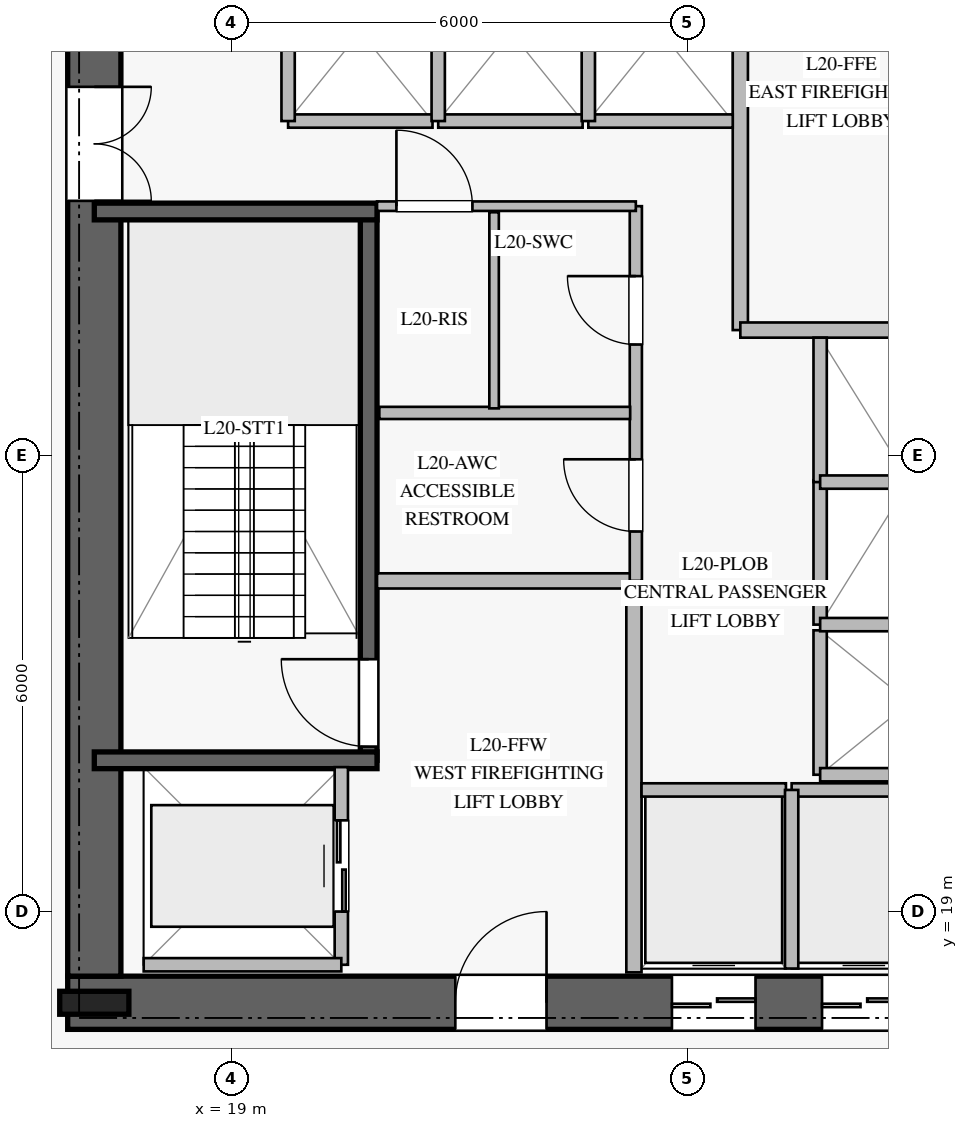
"""IFC4 building model, lengths in metres.
Left out: names, types, materials, properties, quantities, classifications, styles, units other than length and angle.
Written with IfcOpenShell. Run it as: python <this file> out.ifc"""

import sys

from ifc_helpers import new_model, si_unit, direction, frame, frame_2d, origin, origin_2d, place, context, subcontext, project, spatial, rectangle, i_section, extrude, element, fill, save


model = new_model("IFC4")
c1 = context("Model", 3, precision=1e-05, world=origin(), true_north=direction((0.0, 1.0)))
c2 = subcontext(c1, "Body", "Model", "MODEL_VIEW")
j1 = project(units=[si_unit("LENGTHUNIT", "METRE"), si_unit("PLANEANGLEUNIT", "RADIAN")], contexts=[c1])
p1 = place(None, origin())
s1 = spatial("IfcSite", under=j1, at=p1, CompositionType="ELEMENT")
p2 = place(p1, origin())
s2 = spatial("IfcBuilding", under=s1, at=p2, CompositionType="ELEMENT")
p3 = place(p2, frame((0.0, 0.0, 84.0)))
s3 = spatial("IfcBuildingStorey", under=s2, at=p3, CompositionType="ELEMENT", Elevation=84.0)
p4 = place(p3, frame((16.85, 17.8, 0.0), z_axis=(0.0, 0.0, 1.0), x_axis=(1.0, 0.0, 0.0)))
e1 = element("IfcWall", 1, at=p4, inside=s3, PredefinedType="SHEAR", context=c2, shape_type="SweptSolid", body=[
    extrude(rectangle(XDim=16.3, YDim=0.7, at=frame_2d((8.15, 0.0))), origin(), (0.0, 0.0, 1.0), 3.76),
])
p5 = place(p4, frame((5.1, 0.0, 0.0)))
e2 = element("IfcOpeningElement", 2, at=p5, cuts=e1, PredefinedType="OPENING", context=c2, shape_type="SweptSolid", body=[
    extrude(rectangle(XDim=1.2, YDim=2.25, at=frame_2d((0.6, 1.125))), frame((0.0, 0.36, 0.0), z_axis=(0.0, -1.0, 0.0), x_axis=(1.0, 0.0, 0.0)), (0.0, 0.0, 1.0), 0.72),
])
p6 = place(p4, frame((14.05, 0.0, 0.0)))
e3 = element("IfcOpeningElement", 3, at=p6, cuts=e1, PredefinedType="OPENING", context=c2, shape_type="SweptSolid", body=[
    extrude(rectangle(XDim=0.9, YDim=2.1, at=frame_2d((0.45, 1.05))), frame((0.0, 0.36, 0.0), z_axis=(0.0, -1.0, 0.0), x_axis=(1.0, 0.0, 0.0)), (0.0, 0.0, 1.0), 0.72),
])
p7 = place(p4, frame((7.95, 0.0, 0.0)))
e4 = element("IfcOpeningElement", 4, at=p7, cuts=e1, PredefinedType="OPENING", context=c2, shape_type="SweptSolid", body=[
    extrude(rectangle(XDim=1.1, YDim=2.2, at=frame_2d((0.55, 1.1))), frame((0.0, 0.36, 0.0), z_axis=(0.0, -1.0, 0.0), x_axis=(1.0, 0.0, 0.0)), (0.0, 0.0, 1.0), 0.72),
])
p8 = place(p4, frame((9.925, 0.0, 0.0)))
e5 = element("IfcOpeningElement", 5, at=p8, cuts=e1, PredefinedType="OPENING", context=c2, shape_type="SweptSolid", body=[
    extrude(rectangle(XDim=1.1, YDim=2.2, at=frame_2d((0.55, 1.1))), frame((0.0, 0.36, 0.0), z_axis=(0.0, -1.0, 0.0), x_axis=(1.0, 0.0, 0.0)), (0.0, 0.0, 1.0), 0.72),
])
p9 = place(p4, frame((11.9, 0.0, 0.0)))
e6 = element("IfcOpeningElement", 6, at=p9, cuts=e1, PredefinedType="OPENING", context=c2, shape_type="SweptSolid", body=[
    extrude(rectangle(XDim=1.1, YDim=2.2, at=frame_2d((0.55, 1.1))), frame((0.0, 0.36, 0.0), z_axis=(0.0, -1.0, 0.0), x_axis=(1.0, 0.0, 0.0)), (0.0, 0.0, 1.0), 0.72),
])
p10 = place(p3, frame((17.2, 31.85, 0.0), z_axis=(0.0, 0.0, 1.0), x_axis=(0.0, -1.0, 0.0)))
e7 = element("IfcWall", 7, at=p10, inside=s3, PredefinedType="SHEAR", context=c2, shape_type="SweptSolid", body=[
    extrude(rectangle(XDim=13.7, YDim=0.7, at=frame_2d((6.85, 0.0))), origin(), (0.0, 0.0, 1.0), 3.76),
])
p11 = place(p10, frame((2.0, 0.0, 0.0)))
e8 = element("IfcOpeningElement", 8, at=p11, cuts=e7, PredefinedType="OPENING", context=c2, shape_type="SweptSolid", body=[
    extrude(rectangle(XDim=1.5, YDim=2.2, at=frame_2d((0.75, 1.1))), frame((0.0, 0.36, 0.0), z_axis=(0.0, -1.0, 0.0), x_axis=(1.0, 0.0, 0.0)), (0.0, 0.0, 1.0), 0.72),
])
p12 = place(p3, frame((17.2, 17.8, 0.0), z_axis=(0.0, 0.0, 1.0), x_axis=(1.0, 0.0, 0.0)))
e9 = element("IfcColumn", 9, at=p12, inside=s3, PredefinedType="COLUMN", context=c2, shape_type="SweptSolid", body=[
    extrude(i_section(OverallWidth=0.302, OverallDepth=0.91, WebThickness=0.021, FlangeThickness=0.04, at=origin_2d()), origin(), (0.0, 0.0, 1.0), 4.0),
])
p13 = place(p3, frame((20.81, 20.99, 0.0), z_axis=(0.0, 0.0, 1.0), x_axis=(0.0, 1.0, 0.0)))
e10 = element("IfcWall", 10, at=p13, inside=s3, PredefinedType="SOLIDWALL", context=c2, shape_type="SweptSolid", body=[
    extrude(rectangle(XDim=7.22, YDim=0.22, at=frame_2d((3.61, 0.0))), origin(), (0.0, 0.0, 1.0), 3.76),
])
p14 = place(p13, frame((0.18, 0.0, 0.0)))
e11 = element("IfcOpeningElement", 11, at=p14, cuts=e10, PredefinedType="OPENING", context=c2, shape_type="SweptSolid", body=[
    extrude(rectangle(XDim=1.15, YDim=2.2, at=frame_2d((0.575, 1.1))), frame((0.0, 0.12, 0.0), z_axis=(0.0, -1.0, 0.0), x_axis=(1.0, 0.0, 0.0)), (0.0, 0.0, 1.0), 0.24),
])
for number, where, z_axis, x_axis in (
    (12, (17.2, 20.99, 0.0), (0.0, 0.0, 1.0), (1.0, 0.0, 0.0)),
    (13, (17.2, 28.21, 0.0), (0.0, 0.0, 1.0), (1.0, 0.0, 0.0)),
):
    element("IfcWall", number, at=place(p3, frame(where, z_axis=z_axis, x_axis=x_axis)), inside=s3, PredefinedType="SOLIDWALL", context=c2, shape_type="SweptSolid", body=[
        extrude(rectangle(XDim=3.72, YDim=0.22, at=frame_2d((1.86, 0.0))), origin(), (0.0, 0.0, 1.0), 3.76),
    ])
p15 = place(p3, frame((24.3, 18.2, 0.0), z_axis=(0.0, 0.0, 1.0), x_axis=(0.0, 1.0, 0.0)))
e14 = element("IfcWall", 14, at=p15, inside=s3, PredefinedType="PARTITIONING", context=c2, shape_type="SweptSolid", body=[
    extrude(rectangle(XDim=5.15, YDim=0.2, at=frame_2d((2.575, 0.0))), origin(), (0.0, 0.0, 1.0), 3.76),
])
p16 = place(p3, frame((20.92, 23.35, 0.0), z_axis=(0.0, 0.0, 1.0), x_axis=(1.0, 0.0, 0.0)))
e15 = element("IfcWall", 15, at=p16, inside=s3, PredefinedType="PARTITIONING", context=c2, shape_type="SweptSolid", body=[
    extrude(rectangle(XDim=3.38, YDim=0.2, at=frame_2d((1.69, 0.0))), origin(), (0.0, 0.0, 1.0), 3.76),
])
p17 = place(p3, frame((25.7, 26.65, 0.0), z_axis=(0.0, 0.0, 1.0), x_axis=(0.0, 1.0, 0.0)))
e16 = element("IfcWall", 16, at=p17, inside=s3, PredefinedType="PARTITIONING", context=c2, shape_type="SweptSolid", body=[
    extrude(rectangle(XDim=5.15, YDim=0.2, at=frame_2d((2.575, 0.0))), origin(), (0.0, 0.0, 1.0), 3.76),
])
p18 = place(p3, frame((25.7, 26.65, 0.0), z_axis=(0.0, 0.0, 1.0), x_axis=(1.0, 0.0, 0.0)))
e17 = element("IfcWall", 17, at=p18, inside=s3, PredefinedType="PARTITIONING", context=c2, shape_type="SweptSolid", body=[
    extrude(rectangle(XDim=3.38, YDim=0.2, at=frame_2d((1.69, 0.0))), origin(), (0.0, 0.0, 1.0), 3.76),
])
p19 = place(p3, frame((24.325, 23.35, 0.0), z_axis=(0.0, 0.0, 1.0), x_axis=(0.0, 1.0, 0.0)))
e18 = element("IfcWall", 18, at=p19, inside=s3, PredefinedType="PLUMBINGWALL", context=c2, shape_type="SweptSolid", body=[
    extrude(rectangle(XDim=4.93, YDim=0.16, at=frame_2d((2.465, 0.0))), origin(), (0.0, 0.0, 1.0), 3.76),
])
p20 = place(p19, frame((0.65, 0.0, 0.0)))
e19 = element("IfcOpeningElement", 19, at=p20, cuts=e18, PredefinedType="OPENING", context=c2, shape_type="SweptSolid", body=[
    extrude(rectangle(XDim=0.95, YDim=2.1, at=frame_2d((0.475, 1.05))), frame((0.0, 0.09, 0.0), z_axis=(0.0, -1.0, 0.0), x_axis=(1.0, 0.0, 0.0)), (0.0, 0.0, 1.0), 0.18),
])
p21 = place(p19, frame((3.11, 0.0, 0.0)))
e20 = element("IfcOpeningElement", 20, at=p21, cuts=e18, PredefinedType="OPENING", context=c2, shape_type="SweptSolid", body=[
    extrude(rectangle(XDim=0.9, YDim=2.1, at=frame_2d((0.45, 1.05))), frame((0.0, 0.09, 0.0), z_axis=(0.0, -1.0, 0.0), x_axis=(1.0, 0.0, 0.0)), (0.0, 0.0, 1.0), 0.18),
])
p22 = place(p3, frame((20.92, 28.28, 0.0), z_axis=(0.0, 0.0, 1.0), x_axis=(1.0, 0.0, 0.0)))
e21 = element("IfcWall", 21, at=p22, inside=s3, PredefinedType="PARTITIONING", context=c2, shape_type="SweptSolid", body=[
    extrude(rectangle(XDim=3.405, YDim=0.125, at=frame_2d((1.703, 0.0))), origin(), (0.0, 0.0, 1.0), 3.76),
])
p23 = place(p22, frame((0.255, 0.0, 0.0)))
e22 = element("IfcOpeningElement", 22, at=p23, cuts=e21, PredefinedType="OPENING", context=c2, shape_type="SweptSolid", body=[
    extrude(rectangle(XDim=1.0, YDim=2.15, at=frame_2d((0.5, 1.075))), frame((0.0, 0.073, 0.0), z_axis=(0.0, -1.0, 0.0), x_axis=(1.0, 0.0, 0.0)), (0.0, 0.0, 1.0), 0.145),
])
p24 = place(p3, frame((20.95, 25.56, 0.0), z_axis=(0.0, 0.0, 1.0), x_axis=(1.0, 0.0, 0.0)))
e23 = element("IfcWall", 23, at=p24, inside=s3, PredefinedType="PLUMBINGWALL", context=c2, shape_type="SweptSolid", body=[
    extrude(rectangle(XDim=3.3, YDim=0.16, at=frame_2d((1.65, 0.0))), origin(), (0.0, 0.0, 1.0), 3.76),
])
p25 = place(p3, frame((22.46, 25.62, 0.0), z_axis=(0.0, 0.0, 1.0), x_axis=(0.0, 1.0, 0.0)))
e24 = element("IfcWall", 24, at=p25, inside=s3, PredefinedType="PARTITIONING", context=c2, shape_type="SweptSolid", body=[
    extrude(rectangle(XDim=2.58, YDim=0.125, at=frame_2d((1.29, 0.0))), origin(), (0.0, 0.0, 1.0), 3.76),
])
p26 = place(p3, frame((24.4, 20.6, 0.0), z_axis=(0.0, 0.0, 1.0), x_axis=(1.0, 0.0, 0.0)))
e25 = element("IfcWall", 25, at=p26, inside=s3, PredefinedType="PARTITIONING", context=c2, shape_type="SweptSolid", body=[
    extrude(rectangle(XDim=1.9, YDim=0.175, at=frame_2d((0.95, 0.0))), origin(), (0.0, 0.0, 1.0), 3.76),
])
p27 = place(p3, frame((26.375, 20.6, 0.0), z_axis=(0.0, 0.0, 1.0), x_axis=(1.0, 0.0, 0.0)))
e26 = element("IfcWall", 26, at=p27, inside=s3, PredefinedType="PARTITIONING", context=c2, shape_type="SweptSolid", body=[
    extrude(rectangle(XDim=1.9, YDim=0.175, at=frame_2d((0.95, 0.0))), origin(), (0.0, 0.0, 1.0), 3.76),
])
p28 = place(p3, frame((26.375, 18.25, 0.0), z_axis=(0.0, 0.0, 1.0), x_axis=(0.0, 1.0, 0.0)))
e27 = element("IfcWall", 27, at=p28, inside=s3, PredefinedType="PARTITIONING", context=c2, shape_type="SweptSolid", body=[
    extrude(rectangle(XDim=2.35, YDim=0.175, at=frame_2d((1.175, 0.0))), origin(), (0.0, 0.0, 1.0), 3.76),
])
p29 = place(p3, frame((19.75, 29.4, 0.0), z_axis=(0.0, 0.0, 1.0), x_axis=(1.0, 0.0, 0.0)))
e28 = element("IfcWall", 28, at=p29, inside=s3, PredefinedType="PARTITIONING", context=c2, shape_type="SweptSolid", body=[
    extrude(rectangle(XDim=1.9, YDim=0.175, at=frame_2d((0.95, 0.0))), origin(), (0.0, 0.0, 1.0), 3.76),
])
p30 = place(p3, frame((19.75, 29.4, 0.0), z_axis=(0.0, 0.0, 1.0), x_axis=(0.0, 1.0, 0.0)))
e29 = element("IfcWall", 29, at=p30, inside=s3, PredefinedType="PARTITIONING", context=c2, shape_type="SweptSolid", body=[
    extrude(rectangle(XDim=2.35, YDim=0.175, at=frame_2d((1.175, 0.0))), origin(), (0.0, 0.0, 1.0), 3.76),
])
p31 = place(p3, frame((21.725, 29.4, 0.0), z_axis=(0.0, 0.0, 1.0), x_axis=(1.0, 0.0, 0.0)))
e30 = element("IfcWall", 30, at=p31, inside=s3, PredefinedType="PARTITIONING", context=c2, shape_type="SweptSolid", body=[
    extrude(rectangle(XDim=1.9, YDim=0.175, at=frame_2d((0.95, 0.0))), origin(), (0.0, 0.0, 1.0), 3.76),
])
p32 = place(p3, frame((21.725, 29.4, 0.0), z_axis=(0.0, 0.0, 1.0), x_axis=(0.0, 1.0, 0.0)))
e31 = element("IfcWall", 31, at=p32, inside=s3, PredefinedType="PARTITIONING", context=c2, shape_type="SweptSolid", body=[
    extrude(rectangle(XDim=2.35, YDim=0.175, at=frame_2d((1.175, 0.0))), origin(), (0.0, 0.0, 1.0), 3.76),
])
p33 = place(p3, frame((23.7, 29.4, 0.0), z_axis=(0.0, 0.0, 1.0), x_axis=(1.0, 0.0, 0.0)))
e32 = element("IfcWall", 32, at=p33, inside=s3, PredefinedType="PARTITIONING", context=c2, shape_type="SweptSolid", body=[
    extrude(rectangle(XDim=1.9, YDim=0.175, at=frame_2d((0.95, 0.0))), origin(), (0.0, 0.0, 1.0), 3.76),
])
p34 = place(p3, frame((23.7, 29.4, 0.0), z_axis=(0.0, 0.0, 1.0), x_axis=(0.0, 1.0, 0.0)))
e33 = element("IfcWall", 33, at=p34, inside=s3, PredefinedType="PARTITIONING", context=c2, shape_type="SweptSolid", body=[
    extrude(rectangle(XDim=2.35, YDim=0.175, at=frame_2d((1.175, 0.0))), origin(), (0.0, 0.0, 1.0), 3.76),
])
p35 = place(p3, frame((26.75, 20.8, 0.0), z_axis=(0.0, 0.0, 1.0), x_axis=(0.0, 1.0, 0.0)))
e34 = element("IfcWall", 34, at=p35, inside=s3, PredefinedType="PARTITIONING", context=c2, shape_type="SweptSolid", body=[
    extrude(rectangle(XDim=1.9, YDim=0.175, at=frame_2d((0.95, 0.0))), origin(), (0.0, 0.0, 1.0), 3.76),
])
p36 = place(p3, frame((26.75, 20.8, 0.0), z_axis=(0.0, 0.0, 1.0), x_axis=(1.0, 0.0, 0.0)))
e35 = element("IfcWall", 35, at=p36, inside=s3, PredefinedType="PARTITIONING", context=c2, shape_type="SweptSolid", body=[
    extrude(rectangle(XDim=2.35, YDim=0.175, at=frame_2d((1.175, 0.0))), origin(), (0.0, 0.0, 1.0), 3.76),
])
p37 = place(p3, frame((26.75, 22.775, 0.0), z_axis=(0.0, 0.0, 1.0), x_axis=(0.0, 1.0, 0.0)))
e36 = element("IfcWall", 36, at=p37, inside=s3, PredefinedType="PARTITIONING", context=c2, shape_type="SweptSolid", body=[
    extrude(rectangle(XDim=1.9, YDim=0.175, at=frame_2d((0.95, 0.0))), origin(), (0.0, 0.0, 1.0), 3.76),
])
p38 = place(p3, frame((26.75, 22.775, 0.0), z_axis=(0.0, 0.0, 1.0), x_axis=(1.0, 0.0, 0.0)))
e37 = element("IfcWall", 37, at=p38, inside=s3, PredefinedType="PARTITIONING", context=c2, shape_type="SweptSolid", body=[
    extrude(rectangle(XDim=2.35, YDim=0.175, at=frame_2d((1.175, 0.0))), origin(), (0.0, 0.0, 1.0), 3.76),
])
p39 = place(p3, frame((26.75, 24.65, 0.0), z_axis=(0.0, 0.0, 1.0), x_axis=(0.0, 1.0, 0.0)))
e38 = element("IfcWall", 38, at=p39, inside=s3, PredefinedType="PARTITIONING", context=c2, shape_type="SweptSolid", body=[
    extrude(rectangle(XDim=1.9, YDim=0.175, at=frame_2d((0.95, 0.0))), origin(), (0.0, 0.0, 1.0), 3.76),
])
p40 = place(p3, frame((26.75, 24.65, 0.0), z_axis=(0.0, 0.0, 1.0), x_axis=(1.0, 0.0, 0.0)))
e39 = element("IfcWall", 39, at=p40, inside=s3, PredefinedType="PARTITIONING", context=c2, shape_type="SweptSolid", body=[
    extrude(rectangle(XDim=2.35, YDim=0.175, at=frame_2d((1.175, 0.0))), origin(), (0.0, 0.0, 1.0), 3.76),
])
p41 = place(p3, frame((20.45, 18.3, 0.0), z_axis=(0.0, 0.0, 1.0), x_axis=(0.0, 1.0, 0.0)))
e40 = element("IfcWall", 40, at=p41, inside=s3, PredefinedType="PARTITIONING", context=c2, shape_type="SweptSolid", body=[
    extrude(rectangle(XDim=2.6, YDim=0.175, at=frame_2d((1.3, 0.0))), origin(), (0.0, 0.0, 1.0), 3.76),
])
p42 = place(p41, frame((0.7, 0.0, 0.0)))
e41 = element("IfcOpeningElement", 41, at=p42, cuts=e40, PredefinedType="OPENING", context=c2, shape_type="SweptSolid", body=[
    extrude(rectangle(XDim=1.2, YDim=2.2, at=frame_2d((0.6, 1.1))), frame((0.0, 0.098, 0.0), z_axis=(0.0, -1.0, 0.0), x_axis=(1.0, 0.0, 0.0)), (0.0, 0.0, 1.0), 0.195),
])
p43 = place(p3, frame((17.85, 18.3, 0.0), z_axis=(0.0, 0.0, 1.0), x_axis=(1.0, 0.0, 0.0)))
e42 = element("IfcWall", 42, at=p43, inside=s3, PredefinedType="PARTITIONING", context=c2, shape_type="SweptSolid", body=[
    extrude(rectangle(XDim=2.6, YDim=0.175, at=frame_2d((1.3, 0.0))), origin(), (0.0, 0.0, 1.0), 3.76),
])
p44 = place(p14, origin())
e43 = element("IfcDoor", 43, at=p44, inside=s3, OperationType="SINGLE_SWING_RIGHT", PredefinedType="DOOR", context=c2, shape_type="SweptSolid", body=[
    extrude(rectangle(XDim=1.15, YDim=2.2, at=frame_2d((0.575, 1.1))), frame((0.0, 0.025, 0.0), z_axis=(0.0, -1.0, 0.0), x_axis=(1.0, 0.0, 0.0)), (0.0, 0.0, 1.0), 0.05),
])
fill(e11, e43)
p45 = place(p5, origin())
e44 = element("IfcDoor", 44, at=p45, inside=s3, OperationType="SINGLE_SWING_RIGHT", PredefinedType="DOOR", context=c2, shape_type="SweptSolid", body=[
    extrude(rectangle(XDim=1.2, YDim=2.25, at=frame_2d((0.6, 1.125))), frame((0.0, 0.025, 0.0), z_axis=(0.0, -1.0, 0.0), x_axis=(1.0, 0.0, 0.0)), (0.0, 0.0, 1.0), 0.05),
])
fill(e2, e44)
p46 = place(p11, origin())
e45 = element("IfcDoor", 45, at=p46, inside=s3, OperationType="DOUBLE_DOOR_SINGLE_SWING", PredefinedType="DOOR", context=c2, shape_type="SweptSolid", body=[
    extrude(rectangle(XDim=1.5, YDim=2.2, at=frame_2d((0.75, 1.1))), frame((0.0, 0.025, 0.0), z_axis=(0.0, -1.0, 0.0), x_axis=(1.0, 0.0, 0.0)), (0.0, 0.0, 1.0), 0.05),
])
fill(e8, e45)
p47 = place(p20, origin())
e46 = element("IfcDoor", 46, at=p47, inside=s3, OperationType="SINGLE_SWING_RIGHT", PredefinedType="DOOR", context=c2, shape_type="SweptSolid", body=[
    extrude(rectangle(XDim=0.95, YDim=2.1, at=frame_2d((0.475, 1.05))), frame((0.0, 0.025, 0.0), z_axis=(0.0, -1.0, 0.0), x_axis=(1.0, 0.0, 0.0)), (0.0, 0.0, 1.0), 0.05),
])
fill(e19, e46)
p48 = place(p23, origin())
e47 = element("IfcDoor", 47, at=p48, inside=s3, OperationType="SINGLE_SWING_LEFT", PredefinedType="DOOR", context=c2, shape_type="SweptSolid", body=[
    extrude(rectangle(XDim=1.0, YDim=2.15, at=frame_2d((0.5, 1.075))), frame((0.0, 0.025, 0.0), z_axis=(0.0, -1.0, 0.0), x_axis=(1.0, 0.0, 0.0)), (0.0, 0.0, 1.0), 0.05),
])
fill(e22, e47)
p49 = place(p21, origin())
e48 = element("IfcDoor", 48, at=p49, inside=s3, OperationType="SINGLE_SWING_RIGHT", PredefinedType="DOOR", context=c2, shape_type="SweptSolid", body=[
    extrude(rectangle(XDim=0.9, YDim=2.1, at=frame_2d((0.45, 1.05))), frame((0.0, 0.025, 0.0), z_axis=(0.0, -1.0, 0.0), x_axis=(1.0, 0.0, 0.0)), (0.0, 0.0, 1.0), 0.05),
])
fill(e20, e48)
p50 = place(p7, origin())
e49 = element("IfcDoor", 49, at=p50, inside=s3, OperationType="DOUBLE_DOOR_SLIDING", PredefinedType="DOOR", context=c2, shape_type="SweptSolid", body=[
    extrude(rectangle(XDim=1.1, YDim=2.2, at=frame_2d((0.55, 1.1))), frame((0.0, 0.025, 0.0), z_axis=(0.0, -1.0, 0.0), x_axis=(1.0, 0.0, 0.0)), (0.0, 0.0, 1.0), 0.05),
])
fill(e4, e49)
p51 = place(p8, origin())
e50 = element("IfcDoor", 50, at=p51, inside=s3, OperationType="DOUBLE_DOOR_SLIDING", PredefinedType="DOOR", context=c2, shape_type="SweptSolid", body=[
    extrude(rectangle(XDim=1.1, YDim=2.2, at=frame_2d((0.55, 1.1))), frame((0.0, 0.025, 0.0), z_axis=(0.0, -1.0, 0.0), x_axis=(1.0, 0.0, 0.0)), (0.0, 0.0, 1.0), 0.05),
])
fill(e5, e50)
p52 = place(p42, origin())
e51 = element("IfcDoor", 51, at=p52, inside=s3, OperationType="DOUBLE_DOOR_SLIDING", PredefinedType="DOOR", context=c2, shape_type="SweptSolid", body=[
    extrude(rectangle(XDim=1.2, YDim=2.2, at=frame_2d((0.6, 1.1))), frame((0.0, 0.025, 0.0), z_axis=(0.0, -1.0, 0.0), x_axis=(1.0, 0.0, 0.0)), (0.0, 0.0, 1.0), 0.05),
])
fill(e41, e51)
save(model, sys.argv[1])
